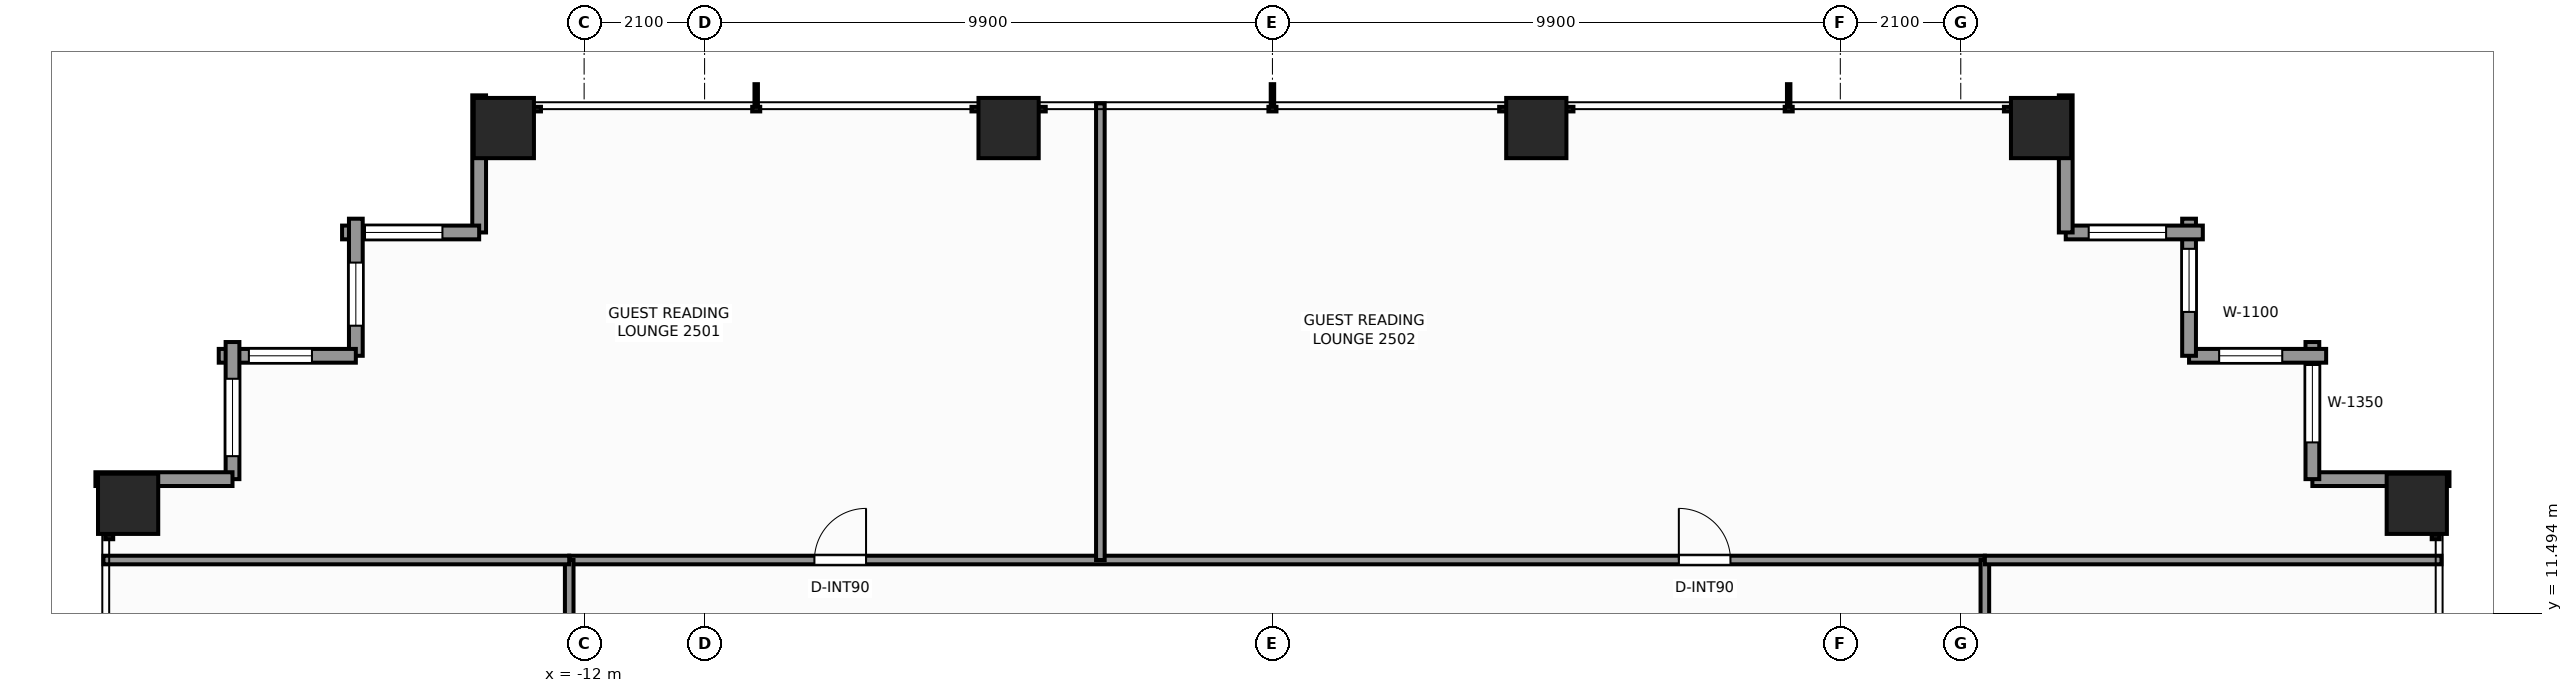
"""IFC4 building model, lengths in metres.
Left out: names, types, materials, properties, quantities, classifications, styles, units other than length and angle.
Written with IfcOpenShell. Run it as: python <this file> out.ifc"""

import sys

from ifc_helpers import new_model, si_unit, direction, frame, frame_2d, origin, origin_2d, place, context, subcontext, project, spatial, rectangle, extrude, element, fill, save


model = new_model("IFC4")
c1 = context("Model", 3, precision=1e-05, world=origin(), true_north=direction((0.0, 1.0)))
c2 = subcontext(c1, "Body", "Model", "MODEL_VIEW")
j1 = project(units=[si_unit("LENGTHUNIT", "METRE"), si_unit("PLANEANGLEUNIT", "RADIAN")], contexts=[c1])
p1 = place(None, origin())
s1 = spatial("IfcSite", under=j1, at=p1, CompositionType="ELEMENT")
p2 = place(p1, origin())
s2 = spatial("IfcBuilding", under=s1, at=p2, CompositionType="ELEMENT")
p3 = place(p2, frame((0.0, 0.0, 88.7)))
s3 = spatial("IfcBuildingStorey", under=s2, at=p3, CompositionType="ELEMENT", Elevation=88.7)
for number, where, z_axis, x_axis in (
    (1, (-13.4, 19.95, 0.0), (0.0, 0.0, 1.0), (1.0, 0.0, 0.0)),
    (2, (-4.6, 19.95, 0.0), (0.0, 0.0, 1.0), (1.0, 0.0, 0.0)),
    (3, (4.6, 19.95, 0.0), (0.0, 0.0, 1.0), (1.0, 0.0, 0.0)),
    (4, (13.4, 19.95, 0.0), (0.0, 0.0, 1.0), (1.0, 0.0, 0.0)),
    (5, (-19.95, 13.4, 0.0), (0.0, 0.0, 1.0), (1.0, 0.0, 0.0)),
    (6, (19.95, 13.4, 0.0), (0.0, 0.0, 1.0), (1.0, 0.0, 0.0)),
):
    element("IfcColumn", number, at=place(p3, frame(where, z_axis=z_axis, x_axis=x_axis)), inside=s3, PredefinedType="COLUMN", context=c2, shape_type="SweptSolid", body=[
        extrude(rectangle(XDim=1.05, YDim=1.05, at=origin_2d()), origin(), (0.0, 0.0, 1.0), 3.3),
    ])
p4 = place(p3, frame((18.13, 13.83, 0.0), z_axis=(0.0, 0.0, 1.0), x_axis=(1.0, 0.0, 0.0)))
e7 = element("IfcWall", 7, at=p4, inside=s3, PredefinedType="STANDARD", context=c2, shape_type="SweptSolid", body=[
    extrude(rectangle(XDim=2.39, YDim=0.24, at=frame_2d((1.195, 0.0))), origin(), (0.0, 0.0, 1.0), 2.459),
])
p5 = place(p3, frame((18.13, 16.22, 0.0), z_axis=(0.0, 0.0, 1.0), x_axis=(0.0, -1.0, 0.0)))
e8 = element("IfcWall", 8, at=p5, inside=s3, PredefinedType="STANDARD", context=c2, shape_type="SweptSolid", body=[
    extrude(rectangle(XDim=2.39, YDim=0.24, at=frame_2d((1.195, 0.0))), origin(), (0.0, 0.0, 1.0), 2.459),
])
p6 = place(p5, frame((0.4, 0.0, 0.65)))
e9 = element("IfcOpeningElement", 9, at=p6, cuts=e8, PredefinedType="OPENING", context=c2, shape_type="SweptSolid", body=[
    extrude(rectangle(XDim=1.35, YDim=1.55, at=frame_2d((0.675, 0.775))), frame((0.0, 0.13, 0.0), z_axis=(0.0, -1.0, 0.0), x_axis=(1.0, 0.0, 0.0)), (0.0, 0.0, 1.0), 0.26),
])
p7 = place(p3, frame((15.98, 15.98, 0.0), z_axis=(0.0, 0.0, 1.0), x_axis=(1.0, 0.0, 0.0)))
e10 = element("IfcWall", 10, at=p7, inside=s3, PredefinedType="STANDARD", context=c2, shape_type="SweptSolid", body=[
    extrude(rectangle(XDim=2.39, YDim=0.24, at=frame_2d((1.195, 0.0))), origin(), (0.0, 0.0, 1.0), 2.459),
])
p8 = place(p7, frame((0.525, 0.0, 0.65)))
e11 = element("IfcOpeningElement", 11, at=p8, cuts=e10, PredefinedType="OPENING", context=c2, shape_type="SweptSolid", body=[
    extrude(rectangle(XDim=1.1, YDim=1.45, at=frame_2d((0.55, 0.725))), frame((0.0, 0.13, 0.0), z_axis=(0.0, -1.0, 0.0), x_axis=(1.0, 0.0, 0.0)), (0.0, 0.0, 1.0), 0.26),
])
p9 = place(p3, frame((15.98, 18.37, 0.0), z_axis=(0.0, 0.0, 1.0), x_axis=(0.0, -1.0, 0.0)))
e12 = element("IfcWall", 12, at=p9, inside=s3, PredefinedType="STANDARD", context=c2, shape_type="SweptSolid", body=[
    extrude(rectangle(XDim=2.39, YDim=0.24, at=frame_2d((1.195, 0.0))), origin(), (0.0, 0.0, 1.0), 2.459),
])
p10 = place(p9, frame((0.525, 0.0, 0.65)))
e13 = element("IfcOpeningElement", 13, at=p10, cuts=e12, PredefinedType="OPENING", context=c2, shape_type="SweptSolid", body=[
    extrude(rectangle(XDim=1.1, YDim=1.45, at=frame_2d((0.55, 0.725))), frame((0.0, 0.13, 0.0), z_axis=(0.0, -1.0, 0.0), x_axis=(1.0, 0.0, 0.0)), (0.0, 0.0, 1.0), 0.26),
])
p11 = place(p3, frame((13.83, 18.13, 0.0), z_axis=(0.0, 0.0, 1.0), x_axis=(1.0, 0.0, 0.0)))
e14 = element("IfcWall", 14, at=p11, inside=s3, PredefinedType="STANDARD", context=c2, shape_type="SweptSolid", body=[
    extrude(rectangle(XDim=2.39, YDim=0.24, at=frame_2d((1.195, 0.0))), origin(), (0.0, 0.0, 1.0), 2.459),
])
p12 = place(p11, frame((0.4, 0.0, 0.65)))
e15 = element("IfcOpeningElement", 15, at=p12, cuts=e14, PredefinedType="OPENING", context=c2, shape_type="SweptSolid", body=[
    extrude(rectangle(XDim=1.35, YDim=1.55, at=frame_2d((0.675, 0.775))), frame((0.0, 0.13, 0.0), z_axis=(0.0, -1.0, 0.0), x_axis=(1.0, 0.0, 0.0)), (0.0, 0.0, 1.0), 0.26),
])
for number, where, z_axis, x_axis in (
    (16, (13.83, 20.52, 0.0), (0.0, 0.0, 1.0), (0.0, -1.0, 0.0)),
    (17, (-13.83, 18.13, 0.0), (0.0, 0.0, 1.0), (0.0, 1.0, 0.0)),
):
    element("IfcWall", number, at=place(p3, frame(where, z_axis=z_axis, x_axis=x_axis)), inside=s3, PredefinedType="STANDARD", context=c2, shape_type="SweptSolid", body=[
        extrude(rectangle(XDim=2.39, YDim=0.24, at=frame_2d((1.195, 0.0))), origin(), (0.0, 0.0, 1.0), 2.459),
    ])
p13 = place(p3, frame((-16.22, 18.13, 0.0), z_axis=(0.0, 0.0, 1.0), x_axis=(1.0, 0.0, 0.0)))
e18 = element("IfcWall", 18, at=p13, inside=s3, PredefinedType="STANDARD", context=c2, shape_type="SweptSolid", body=[
    extrude(rectangle(XDim=2.39, YDim=0.24, at=frame_2d((1.195, 0.0))), origin(), (0.0, 0.0, 1.0), 2.459),
])
p14 = place(p13, frame((0.4, 0.0, 0.65)))
e19 = element("IfcOpeningElement", 19, at=p14, cuts=e18, PredefinedType="OPENING", context=c2, shape_type="SweptSolid", body=[
    extrude(rectangle(XDim=1.35, YDim=1.55, at=frame_2d((0.675, 0.775))), frame((0.0, 0.13, 0.0), z_axis=(0.0, -1.0, 0.0), x_axis=(1.0, 0.0, 0.0)), (0.0, 0.0, 1.0), 0.26),
])
p15 = place(p3, frame((-15.98, 15.98, 0.0), z_axis=(0.0, 0.0, 1.0), x_axis=(0.0, 1.0, 0.0)))
e20 = element("IfcWall", 20, at=p15, inside=s3, PredefinedType="STANDARD", context=c2, shape_type="SweptSolid", body=[
    extrude(rectangle(XDim=2.39, YDim=0.24, at=frame_2d((1.195, 0.0))), origin(), (0.0, 0.0, 1.0), 2.459),
])
p16 = place(p15, frame((0.525, 0.0, 0.65)))
e21 = element("IfcOpeningElement", 21, at=p16, cuts=e20, PredefinedType="OPENING", context=c2, shape_type="SweptSolid", body=[
    extrude(rectangle(XDim=1.1, YDim=1.45, at=frame_2d((0.55, 0.725))), frame((0.0, 0.13, 0.0), z_axis=(0.0, -1.0, 0.0), x_axis=(1.0, 0.0, 0.0)), (0.0, 0.0, 1.0), 0.26),
])
p17 = place(p3, frame((-18.37, 15.98, 0.0), z_axis=(0.0, 0.0, 1.0), x_axis=(1.0, 0.0, 0.0)))
e22 = element("IfcWall", 22, at=p17, inside=s3, PredefinedType="STANDARD", context=c2, shape_type="SweptSolid", body=[
    extrude(rectangle(XDim=2.39, YDim=0.24, at=frame_2d((1.195, 0.0))), origin(), (0.0, 0.0, 1.0), 2.459),
])
p18 = place(p17, frame((0.525, 0.0, 0.65)))
e23 = element("IfcOpeningElement", 23, at=p18, cuts=e22, PredefinedType="OPENING", context=c2, shape_type="SweptSolid", body=[
    extrude(rectangle(XDim=1.1, YDim=1.45, at=frame_2d((0.55, 0.725))), frame((0.0, 0.13, 0.0), z_axis=(0.0, -1.0, 0.0), x_axis=(1.0, 0.0, 0.0)), (0.0, 0.0, 1.0), 0.26),
])
p19 = place(p3, frame((-18.13, 13.83, 0.0), z_axis=(0.0, 0.0, 1.0), x_axis=(0.0, 1.0, 0.0)))
e24 = element("IfcWall", 24, at=p19, inside=s3, PredefinedType="STANDARD", context=c2, shape_type="SweptSolid", body=[
    extrude(rectangle(XDim=2.39, YDim=0.24, at=frame_2d((1.195, 0.0))), origin(), (0.0, 0.0, 1.0), 2.459),
])
p20 = place(p19, frame((0.4, 0.0, 0.65)))
e25 = element("IfcOpeningElement", 25, at=p20, cuts=e24, PredefinedType="OPENING", context=c2, shape_type="SweptSolid", body=[
    extrude(rectangle(XDim=1.35, YDim=1.55, at=frame_2d((0.675, 0.775))), frame((0.0, 0.13, 0.0), z_axis=(0.0, -1.0, 0.0), x_axis=(1.0, 0.0, 0.0)), (0.0, 0.0, 1.0), 0.26),
])
p21 = place(p3, frame((-20.52, 13.83, 0.0), z_axis=(0.0, 0.0, 1.0), x_axis=(1.0, 0.0, 0.0)))
e26 = element("IfcWall", 26, at=p21, inside=s3, PredefinedType="STANDARD", context=c2, shape_type="SweptSolid", body=[
    extrude(rectangle(XDim=2.39, YDim=0.24, at=frame_2d((1.195, 0.0))), origin(), (0.0, 0.0, 1.0), 2.459),
])
p22 = place(p3, frame((-12.26, 12.42, 0.0), z_axis=(0.0, 0.0, 1.0), x_axis=(1.0, 0.0, 0.0)))
e27 = element("IfcWall", 27, at=p22, inside=s3, PredefinedType="PARTITIONING", context=c2, shape_type="SweptSolid", body=[
    extrude(rectangle(XDim=24.68, YDim=0.15, at=frame_2d((12.34, 0.0))), origin(), (0.0, 0.0, 1.0), 2.292),
])
p23 = place(p22, frame((4.275, 0.0, 0.0)))
e28 = element("IfcOpeningElement", 28, at=p23, cuts=e27, PredefinedType="OPENING", context=c2, shape_type="SweptSolid", body=[
    extrude(rectangle(XDim=0.9, YDim=2.06, at=frame_2d((0.45, 1.03))), frame((0.0, 0.085, 0.0), z_axis=(0.0, -1.0, 0.0), x_axis=(1.0, 0.0, 0.0)), (0.0, 0.0, 1.0), 0.17),
])
p24 = place(p22, frame((19.345, 0.0, 0.0)))
e29 = element("IfcOpeningElement", 29, at=p24, cuts=e27, PredefinedType="OPENING", context=c2, shape_type="SweptSolid", body=[
    extrude(rectangle(XDim=0.9, YDim=2.06, at=frame_2d((0.45, 1.03))), frame((0.0, 0.085, 0.0), z_axis=(0.0, -1.0, 0.0), x_axis=(1.0, 0.0, 0.0)), (0.0, 0.0, 1.0), 0.17),
])
p25 = place(p3, frame((-12.26, 7.4, 0.0), z_axis=(0.0, 0.0, 1.0), x_axis=(0.0, 1.0, 0.0)))
e30 = element("IfcWall", 30, at=p25, inside=s3, PredefinedType="PARTITIONING", context=c2, shape_type="SweptSolid", body=[
    extrude(rectangle(XDim=5.02, YDim=0.15, at=frame_2d((2.51, 0.0))), origin(), (0.0, 0.0, 1.0), 2.292),
])
p26 = place(p25, frame((0.811, 0.0, 0.0)))
e31 = element("IfcOpeningElement", 31, at=p26, cuts=e30, PredefinedType="OPENING", context=c2, shape_type="SweptSolid", body=[
    extrude(rectangle(XDim=0.9, YDim=2.06, at=frame_2d((0.45, 1.03))), frame((0.0, 0.085, 0.0), z_axis=(0.0, -1.0, 0.0), x_axis=(1.0, 0.0, 0.0)), (0.0, 0.0, 1.0), 0.17),
])
p27 = place(p3, frame((12.42, -12.42, 0.0), z_axis=(0.0, 0.0, 1.0), x_axis=(0.0, 1.0, 0.0)))
e32 = element("IfcWall", 32, at=p27, inside=s3, PredefinedType="PARTITIONING", context=c2, shape_type="SweptSolid", body=[
    extrude(rectangle(XDim=24.84, YDim=0.15, at=frame_2d((12.42, 0.0))), origin(), (0.0, 0.0, 1.0), 2.292),
])
p28 = place(p27, frame((4.435, 0.0, 0.0)))
e33 = element("IfcOpeningElement", 33, at=p28, cuts=e32, PredefinedType="OPENING", context=c2, shape_type="SweptSolid", body=[
    extrude(rectangle(XDim=0.9, YDim=2.06, at=frame_2d((0.45, 1.03))), frame((0.0, 0.085, 0.0), z_axis=(0.0, -1.0, 0.0), x_axis=(1.0, 0.0, 0.0)), (0.0, 0.0, 1.0), 0.17),
])
p29 = place(p27, frame((19.505, 0.0, 0.0)))
e34 = element("IfcOpeningElement", 34, at=p29, cuts=e32, PredefinedType="OPENING", context=c2, shape_type="SweptSolid", body=[
    extrude(rectangle(XDim=0.9, YDim=2.06, at=frame_2d((0.45, 1.03))), frame((0.0, 0.085, 0.0), z_axis=(0.0, -1.0, 0.0), x_axis=(1.0, 0.0, 0.0)), (0.0, 0.0, 1.0), 0.17),
])
p30 = place(p3, frame((-20.38, 12.42, 0.0), z_axis=(0.0, 0.0, 1.0), x_axis=(1.0, 0.0, 0.0)))
e35 = element("IfcWall", 35, at=p30, inside=s3, PredefinedType="PARTITIONING", context=c2, shape_type="SweptSolid", body=[
    extrude(rectangle(XDim=8.12, YDim=0.15, at=frame_2d((4.06, 0.0))), origin(), (0.0, 0.0, 1.0), 2.292),
])
p31 = place(p3, frame((12.42, 12.42, 0.0), z_axis=(0.0, 0.0, 1.0), x_axis=(1.0, 0.0, 0.0)))
e36 = element("IfcWall", 36, at=p31, inside=s3, PredefinedType="PARTITIONING", context=c2, shape_type="SweptSolid", body=[
    extrude(rectangle(XDim=7.96, YDim=0.15, at=frame_2d((3.98, 0.0))), origin(), (0.0, 0.0, 1.0), 2.292),
])
p32 = place(p3, frame((-3.0, 12.42, 0.0), z_axis=(0.0, 0.0, 1.0), x_axis=(0.0, 1.0, 0.0)))
e37 = element("IfcWall", 37, at=p32, inside=s3, PredefinedType="PARTITIONING", context=c2, shape_type="SweptSolid", body=[
    extrude(rectangle(XDim=7.96, YDim=0.15, at=frame_2d((3.98, 0.0))), origin(), (0.0, 0.0, 1.0), 2.449),
])
p33 = place(p6, origin())
e38 = element("IfcWindow", 38, at=p33, inside=s3, PartitioningType="SINGLE_PANEL", PredefinedType="WINDOW", context=c2, shape_type="SweptSolid", body=[
    extrude(rectangle(XDim=1.35, YDim=1.55, at=frame_2d((0.675, 0.775))), frame((0.0, 0.03, 0.0), z_axis=(0.0, -1.0, 0.0), x_axis=(1.0, 0.0, 0.0)), (0.0, 0.0, 1.0), 0.06),
])
fill(e9, e38)
p34 = place(p8, origin())
e39 = element("IfcWindow", 39, at=p34, inside=s3, PartitioningType="SINGLE_PANEL", PredefinedType="WINDOW", context=c2, shape_type="SweptSolid", body=[
    extrude(rectangle(XDim=1.1, YDim=1.45, at=frame_2d((0.55, 0.725))), frame((0.0, 0.03, 0.0), z_axis=(0.0, -1.0, 0.0), x_axis=(1.0, 0.0, 0.0)), (0.0, 0.0, 1.0), 0.06),
])
fill(e11, e39)
p35 = place(p10, origin())
e40 = element("IfcWindow", 40, at=p35, inside=s3, PartitioningType="SINGLE_PANEL", PredefinedType="WINDOW", context=c2, shape_type="SweptSolid", body=[
    extrude(rectangle(XDim=1.1, YDim=1.45, at=frame_2d((0.55, 0.725))), frame((0.0, 0.03, 0.0), z_axis=(0.0, -1.0, 0.0), x_axis=(1.0, 0.0, 0.0)), (0.0, 0.0, 1.0), 0.06),
])
fill(e13, e40)
p36 = place(p12, origin())
e41 = element("IfcWindow", 41, at=p36, inside=s3, PartitioningType="SINGLE_PANEL", PredefinedType="WINDOW", context=c2, shape_type="SweptSolid", body=[
    extrude(rectangle(XDim=1.35, YDim=1.55, at=frame_2d((0.675, 0.775))), frame((0.0, 0.03, 0.0), z_axis=(0.0, -1.0, 0.0), x_axis=(1.0, 0.0, 0.0)), (0.0, 0.0, 1.0), 0.06),
])
fill(e15, e41)
p37 = place(p14, origin())
e42 = element("IfcWindow", 42, at=p37, inside=s3, PartitioningType="SINGLE_PANEL", PredefinedType="WINDOW", context=c2, shape_type="SweptSolid", body=[
    extrude(rectangle(XDim=1.35, YDim=1.55, at=frame_2d((0.675, 0.775))), frame((0.0, 0.03, 0.0), z_axis=(0.0, -1.0, 0.0), x_axis=(1.0, 0.0, 0.0)), (0.0, 0.0, 1.0), 0.06),
])
fill(e19, e42)
p38 = place(p16, origin())
e43 = element("IfcWindow", 43, at=p38, inside=s3, PartitioningType="SINGLE_PANEL", PredefinedType="WINDOW", context=c2, shape_type="SweptSolid", body=[
    extrude(rectangle(XDim=1.1, YDim=1.45, at=frame_2d((0.55, 0.725))), frame((0.0, 0.03, 0.0), z_axis=(0.0, -1.0, 0.0), x_axis=(1.0, 0.0, 0.0)), (0.0, 0.0, 1.0), 0.06),
])
fill(e21, e43)
p39 = place(p18, origin())
e44 = element("IfcWindow", 44, at=p39, inside=s3, PartitioningType="SINGLE_PANEL", PredefinedType="WINDOW", context=c2, shape_type="SweptSolid", body=[
    extrude(rectangle(XDim=1.1, YDim=1.45, at=frame_2d((0.55, 0.725))), frame((0.0, 0.03, 0.0), z_axis=(0.0, -1.0, 0.0), x_axis=(1.0, 0.0, 0.0)), (0.0, 0.0, 1.0), 0.06),
])
fill(e23, e44)
p40 = place(p20, origin())
e45 = element("IfcWindow", 45, at=p40, inside=s3, PartitioningType="SINGLE_PANEL", PredefinedType="WINDOW", context=c2, shape_type="SweptSolid", body=[
    extrude(rectangle(XDim=1.35, YDim=1.55, at=frame_2d((0.675, 0.775))), frame((0.0, 0.03, 0.0), z_axis=(0.0, -1.0, 0.0), x_axis=(1.0, 0.0, 0.0)), (0.0, 0.0, 1.0), 0.06),
])
fill(e25, e45)
p41 = place(p23, origin())
e46 = element("IfcDoor", 46, at=p41, inside=s3, OperationType="SINGLE_SWING_RIGHT", PredefinedType="DOOR", context=c2, shape_type="SweptSolid", body=[
    extrude(rectangle(XDim=0.9, YDim=2.06, at=frame_2d((0.45, 1.03))), frame((0.0, 0.025, 0.0), z_axis=(0.0, -1.0, 0.0), x_axis=(1.0, 0.0, 0.0)), (0.0, 0.0, 1.0), 0.05),
])
fill(e28, e46)
p42 = place(p24, origin())
e47 = element("IfcDoor", 47, at=p42, inside=s3, OperationType="SINGLE_SWING_LEFT", PredefinedType="DOOR", context=c2, shape_type="SweptSolid", body=[
    extrude(rectangle(XDim=0.9, YDim=2.06, at=frame_2d((0.45, 1.03))), frame((0.0, 0.025, 0.0), z_axis=(0.0, -1.0, 0.0), x_axis=(1.0, 0.0, 0.0)), (0.0, 0.0, 1.0), 0.05),
])
fill(e29, e47)
save(model, sys.argv[1])
